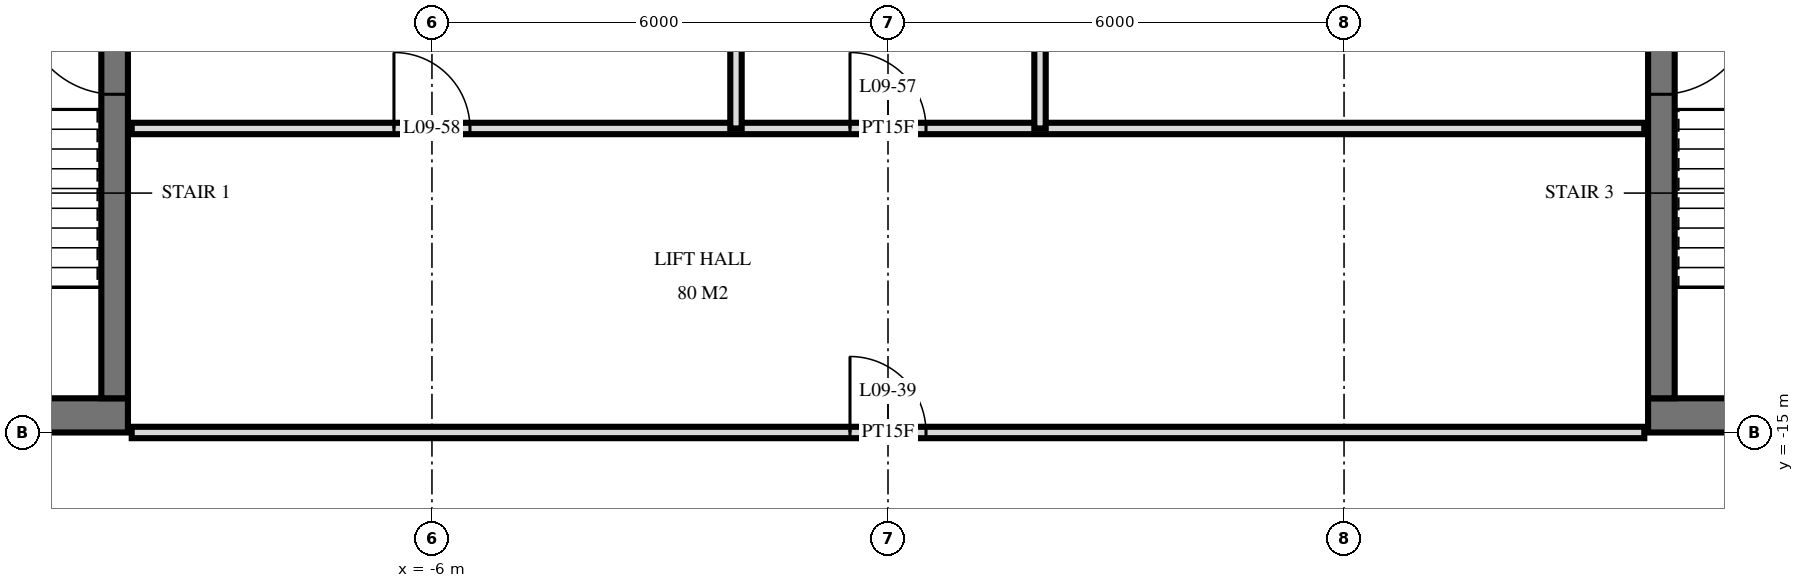
"""IFC4 building model, lengths in metres.
Left out: names, types, materials, properties, quantities, classifications, styles, units other than length and angle.
Written with IfcOpenShell. Run it as: python <this file> out.ifc"""

import sys

from ifc_helpers import new_model, si_unit, direction, frame, frame_2d, origin, place, context, subcontext, project, spatial, rectangle, extrude, element, fill, save


model = new_model("IFC4")
c1 = context("Model", 3, precision=1e-05, world=origin(), true_north=direction((0.0, 1.0)))
c2 = subcontext(c1, "Body", "Model", "MODEL_VIEW")
j1 = project(units=[si_unit("LENGTHUNIT", "METRE"), si_unit("PLANEANGLEUNIT", "RADIAN")], contexts=[c1])
p1 = place(None, origin())
s1 = spatial("IfcSite", under=j1, at=p1, CompositionType="ELEMENT")
p2 = place(p1, origin())
s2 = spatial("IfcBuilding", under=s1, at=p2, CompositionType="ELEMENT")
p3 = place(p2, frame((0.0, 0.0, 42.0)))
s3 = spatial("IfcBuildingStorey", under=s2, at=p3, CompositionType="ELEMENT", Elevation=42.0)
p4 = place(p3, frame((-29.5, -14.775, 0.0), z_axis=(0.0, 0.0, 1.0), x_axis=(1.0, 0.0, 0.0)))
e1 = element("IfcWall", 1, at=p4, inside=s3, PredefinedType="SHEAR", context=c2, shape_type="SweptSolid", body=[
    extrude(rectangle(XDim=19.5, YDim=0.45, at=frame_2d((9.75, 0.0))), origin(), (0.0, 0.0, 1.0), 3.6),
])
p5 = place(p4, frame((11.2, 0.0, 0.0)))
e2 = element("IfcOpeningElement", 2, at=p5, cuts=e1, PredefinedType="OPENING", context=c2, shape_type="SweptSolid", body=[
    extrude(rectangle(XDim=1.2, YDim=2.1, at=frame_2d((0.6, 1.05))), frame((0.0, 0.235, 0.0), z_axis=(0.0, -1.0, 0.0), x_axis=(1.0, 0.0, 0.0)), (0.0, 0.0, 1.0), 0.47),
])
p6 = place(p4, frame((14.25, 0.0, 0.0)))
e3 = element("IfcOpeningElement", 3, at=p6, cuts=e1, PredefinedType="OPENING", context=c2, shape_type="SweptSolid", body=[
    extrude(rectangle(XDim=1.1, YDim=2.1, at=frame_2d((0.55, 1.05))), frame((0.0, 0.235, 0.0), z_axis=(0.0, -1.0, 0.0), x_axis=(1.0, 0.0, 0.0)), (0.0, 0.0, 1.0), 0.47),
])
p7 = place(p4, frame((8.5, 0.0, 0.0)))
e4 = element("IfcOpeningElement", 4, at=p7, cuts=e1, PredefinedType="OPENING", context=c2, shape_type="SweptSolid", body=[
    extrude(rectangle(XDim=0.9, YDim=2.1, at=frame_2d((0.45, 1.05))), frame((0.0, 0.235, 0.0), z_axis=(0.0, -1.0, 0.0), x_axis=(1.0, 0.0, 0.0)), (0.0, 0.0, 1.0), 0.47),
])
p8 = place(p4, frame((6.05, 0.0, 0.0)))
e5 = element("IfcOpeningElement", 5, at=p8, cuts=e1, PredefinedType="OPENING", context=c2, shape_type="SweptSolid", body=[
    extrude(rectangle(XDim=1.0, YDim=2.1, at=frame_2d((0.5, 1.05))), frame((0.0, 0.235, 0.0), z_axis=(0.0, -1.0, 0.0), x_axis=(1.0, 0.0, 0.0)), (0.0, 0.0, 1.0), 0.47),
])
p9 = place(p4, frame((3.587, 0.0, 0.0)))
e6 = element("IfcOpeningElement", 6, at=p9, cuts=e1, PredefinedType="OPENING", context=c2, shape_type="SweptSolid", body=[
    extrude(rectangle(XDim=1.0, YDim=2.1, at=frame_2d((0.5, 1.05))), frame((0.0, 0.235, 0.0), z_axis=(0.0, -1.0, 0.0), x_axis=(1.0, 0.0, 0.0)), (0.0, 0.0, 1.0), 0.47),
])
p10 = place(p4, frame((1.85, 0.0, 0.0)))
e7 = element("IfcOpeningElement", 7, at=p10, cuts=e1, PredefinedType="OPENING", context=c2, shape_type="SweptSolid", body=[
    extrude(rectangle(XDim=1.0, YDim=2.1, at=frame_2d((0.5, 1.05))), frame((0.0, 0.235, 0.0), z_axis=(0.0, -1.0, 0.0), x_axis=(1.0, 0.0, 0.0)), (0.0, 0.0, 1.0), 0.47),
])
p11 = place(p4, frame((0.55, 0.0, 0.0)))
e8 = element("IfcOpeningElement", 8, at=p11, cuts=e1, PredefinedType="OPENING", context=c2, shape_type="SweptSolid", body=[
    extrude(rectangle(XDim=1.0, YDim=2.1, at=frame_2d((0.5, 1.05))), frame((0.0, 0.235, 0.0), z_axis=(0.0, -1.0, 0.0), x_axis=(1.0, 0.0, 0.0)), (0.0, 0.0, 1.0), 0.47),
])
p12 = place(p3, frame((-10.175, -14.55, 0.0), z_axis=(0.0, 0.0, 1.0), x_axis=(0.0, 1.0, 0.0)))
e9 = element("IfcWall", 9, at=p12, inside=s3, PredefinedType="SHEAR", context=c2, shape_type="SweptSolid", body=[
    extrude(rectangle(XDim=14.1, YDim=0.35, at=frame_2d((7.05, 0.0))), origin(), (0.0, 0.0, 1.0), 3.6),
])
p13 = place(p12, frame((8.4, 0.0, 0.0)))
e10 = element("IfcOpeningElement", 10, at=p13, cuts=e9, PredefinedType="OPENING", context=c2, shape_type="SweptSolid", body=[
    extrude(rectangle(XDim=1.4, YDim=2.4, at=frame_2d((0.7, 1.2))), frame((0.0, 0.185, 0.0), z_axis=(0.0, -1.0, 0.0), x_axis=(1.0, 0.0, 0.0)), (0.0, 0.0, 1.0), 0.37),
])
p14 = place(p12, frame((10.0, 0.0, 0.0)))
e11 = element("IfcOpeningElement", 11, at=p14, cuts=e9, PredefinedType="OPENING", context=c2, shape_type="SweptSolid", body=[
    extrude(rectangle(XDim=1.4, YDim=2.4, at=frame_2d((0.7, 1.2))), frame((0.0, 0.185, 0.0), z_axis=(0.0, -1.0, 0.0), x_axis=(1.0, 0.0, 0.0)), (0.0, 0.0, 1.0), 0.37),
])
p15 = place(p12, frame((4.0, 0.0, 0.0)))
e12 = element("IfcOpeningElement", 12, at=p15, cuts=e9, PredefinedType="OPENING", context=c2, shape_type="SweptSolid", body=[
    extrude(rectangle(XDim=1.2, YDim=2.1, at=frame_2d((0.6, 1.05))), frame((0.0, 0.185, 0.0), z_axis=(0.0, -1.0, 0.0), x_axis=(1.0, 0.0, 0.0)), (0.0, 0.0, 1.0), 0.37),
])
p16 = place(p3, frame((10.0, -14.775, 0.0), z_axis=(0.0, 0.0, 1.0), x_axis=(1.0, 0.0, 0.0)))
e13 = element("IfcWall", 13, at=p16, inside=s3, PredefinedType="SHEAR", context=c2, shape_type="SweptSolid", body=[
    extrude(rectangle(XDim=19.5, YDim=0.45, at=frame_2d((9.75, 0.0))), origin(), (0.0, 0.0, 1.0), 3.6),
])
p17 = place(p16, frame((7.1, 0.0, 0.0)))
e14 = element("IfcOpeningElement", 14, at=p17, cuts=e13, PredefinedType="OPENING", context=c2, shape_type="SweptSolid", body=[
    extrude(rectangle(XDim=1.2, YDim=2.1, at=frame_2d((0.6, 1.05))), frame((0.0, 0.235, 0.0), z_axis=(0.0, -1.0, 0.0), x_axis=(1.0, 0.0, 0.0)), (0.0, 0.0, 1.0), 0.47),
])
p18 = place(p16, frame((4.15, 0.0, 0.0)))
e15 = element("IfcOpeningElement", 15, at=p18, cuts=e13, PredefinedType="OPENING", context=c2, shape_type="SweptSolid", body=[
    extrude(rectangle(XDim=1.1, YDim=2.1, at=frame_2d((0.55, 1.05))), frame((0.0, 0.235, 0.0), z_axis=(0.0, -1.0, 0.0), x_axis=(1.0, 0.0, 0.0)), (0.0, 0.0, 1.0), 0.47),
])
p19 = place(p16, frame((10.1, 0.0, 0.0)))
e16 = element("IfcOpeningElement", 16, at=p19, cuts=e13, PredefinedType="OPENING", context=c2, shape_type="SweptSolid", body=[
    extrude(rectangle(XDim=0.9, YDim=2.1, at=frame_2d((0.45, 1.05))), frame((0.0, 0.235, 0.0), z_axis=(0.0, -1.0, 0.0), x_axis=(1.0, 0.0, 0.0)), (0.0, 0.0, 1.0), 0.47),
])
p20 = place(p16, frame((12.45, 0.0, 0.0)))
e17 = element("IfcOpeningElement", 17, at=p20, cuts=e13, PredefinedType="OPENING", context=c2, shape_type="SweptSolid", body=[
    extrude(rectangle(XDim=1.0, YDim=2.1, at=frame_2d((0.5, 1.05))), frame((0.0, 0.235, 0.0), z_axis=(0.0, -1.0, 0.0), x_axis=(1.0, 0.0, 0.0)), (0.0, 0.0, 1.0), 0.47),
])
p21 = place(p16, frame((14.913, 0.0, 0.0)))
e18 = element("IfcOpeningElement", 18, at=p21, cuts=e13, PredefinedType="OPENING", context=c2, shape_type="SweptSolid", body=[
    extrude(rectangle(XDim=1.0, YDim=2.1, at=frame_2d((0.5, 1.05))), frame((0.0, 0.235, 0.0), z_axis=(0.0, -1.0, 0.0), x_axis=(1.0, 0.0, 0.0)), (0.0, 0.0, 1.0), 0.47),
])
p22 = place(p16, frame((16.65, 0.0, 0.0)))
e19 = element("IfcOpeningElement", 19, at=p22, cuts=e13, PredefinedType="OPENING", context=c2, shape_type="SweptSolid", body=[
    extrude(rectangle(XDim=1.0, YDim=2.1, at=frame_2d((0.5, 1.05))), frame((0.0, 0.235, 0.0), z_axis=(0.0, -1.0, 0.0), x_axis=(1.0, 0.0, 0.0)), (0.0, 0.0, 1.0), 0.47),
])
p23 = place(p16, frame((18.025, 0.0, 0.0)))
e20 = element("IfcOpeningElement", 20, at=p23, cuts=e13, PredefinedType="OPENING", context=c2, shape_type="SweptSolid", body=[
    extrude(rectangle(XDim=1.0, YDim=2.1, at=frame_2d((0.5, 1.05))), frame((0.0, 0.235, 0.0), z_axis=(0.0, -1.0, 0.0), x_axis=(1.0, 0.0, 0.0)), (0.0, 0.0, 1.0), 0.47),
])
p24 = place(p3, frame((10.175, -14.55, 0.0), z_axis=(0.0, 0.0, 1.0), x_axis=(0.0, 1.0, 0.0)))
e21 = element("IfcWall", 21, at=p24, inside=s3, PredefinedType="SHEAR", context=c2, shape_type="SweptSolid", body=[
    extrude(rectangle(XDim=14.1, YDim=0.35, at=frame_2d((7.05, 0.0))), origin(), (0.0, 0.0, 1.0), 3.6),
])
p25 = place(p24, frame((8.4, 0.0, 0.0)))
e22 = element("IfcOpeningElement", 22, at=p25, cuts=e21, PredefinedType="OPENING", context=c2, shape_type="SweptSolid", body=[
    extrude(rectangle(XDim=1.4, YDim=2.4, at=frame_2d((0.7, 1.2))), frame((0.0, 0.185, 0.0), z_axis=(0.0, -1.0, 0.0), x_axis=(1.0, 0.0, 0.0)), (0.0, 0.0, 1.0), 0.37),
])
p26 = place(p24, frame((10.0, 0.0, 0.0)))
e23 = element("IfcOpeningElement", 23, at=p26, cuts=e21, PredefinedType="OPENING", context=c2, shape_type="SweptSolid", body=[
    extrude(rectangle(XDim=1.4, YDim=2.4, at=frame_2d((0.7, 1.2))), frame((0.0, 0.185, 0.0), z_axis=(0.0, -1.0, 0.0), x_axis=(1.0, 0.0, 0.0)), (0.0, 0.0, 1.0), 0.37),
])
p27 = place(p24, frame((4.0, 0.0, 0.0)))
e24 = element("IfcOpeningElement", 24, at=p27, cuts=e21, PredefinedType="OPENING", context=c2, shape_type="SweptSolid", body=[
    extrude(rectangle(XDim=1.2, YDim=2.1, at=frame_2d((0.6, 1.05))), frame((0.0, 0.185, 0.0), z_axis=(0.0, -1.0, 0.0), x_axis=(1.0, 0.0, 0.0)), (0.0, 0.0, 1.0), 0.37),
])
for number, where, z_axis, x_axis in (
    (25, (2.0, -11.0, 0.0), (0.0, 0.0, 1.0), (0.0, 1.0, 0.0)),
    (26, (-2.0, -11.0, 0.0), (0.0, 0.0, 1.0), (0.0, 1.0, 0.0)),
):
    element("IfcWall", number, at=place(p3, frame(where, z_axis=z_axis, x_axis=x_axis)), inside=s3, PredefinedType="PARTITIONING", context=c2, shape_type="SweptSolid", body=[
        extrude(rectangle(XDim=4.0, YDim=0.15, at=frame_2d((2.0, 0.0))), origin(), (0.0, 0.0, 1.0), 3.32),
    ])
p28 = place(p3, frame((-9.95, -15.0, 0.0), z_axis=(0.0, 0.0, 1.0), x_axis=(1.0, 0.0, 0.0)))
e27 = element("IfcWall", 27, at=p28, inside=s3, PredefinedType="PARTITIONING", context=c2, shape_type="SweptSolid", body=[
    extrude(rectangle(XDim=19.9, YDim=0.15, at=frame_2d((9.95, 0.0))), origin(), (0.0, 0.0, 1.0), 2.684),
])
p29 = place(p28, frame((9.45, 0.0, 0.0)))
e28 = element("IfcOpeningElement", 28, at=p29, cuts=e27, PredefinedType="OPENING", context=c2, shape_type="SweptSolid", body=[
    extrude(rectangle(XDim=1.0, YDim=2.1, at=frame_2d((0.5, 1.05))), frame((0.0, 0.085, 0.0), z_axis=(0.0, -1.0, 0.0), x_axis=(1.0, 0.0, 0.0)), (0.0, 0.0, 1.0), 0.17),
])
p30 = place(p3, frame((-9.95, -11.0, 0.0), z_axis=(0.0, 0.0, 1.0), x_axis=(1.0, 0.0, 0.0)))
e29 = element("IfcWall", 29, at=p30, inside=s3, PredefinedType="PARTITIONING", context=c2, shape_type="SweptSolid", body=[
    extrude(rectangle(XDim=19.9, YDim=0.15, at=frame_2d((9.95, 0.0))), origin(), (0.0, 0.0, 1.0), 3.32),
])
p31 = place(p30, frame((9.45, 0.0, 0.0)))
e30 = element("IfcOpeningElement", 30, at=p31, cuts=e29, PredefinedType="OPENING", context=c2, shape_type="SweptSolid", body=[
    extrude(rectangle(XDim=1.0, YDim=2.1, at=frame_2d((0.5, 1.05))), frame((0.0, 0.085, 0.0), z_axis=(0.0, -1.0, 0.0), x_axis=(1.0, 0.0, 0.0)), (0.0, 0.0, 1.0), 0.17),
])
p32 = place(p30, frame((3.45, 0.0, 0.0)))
e31 = element("IfcOpeningElement", 31, at=p32, cuts=e29, PredefinedType="OPENING", context=c2, shape_type="SweptSolid", body=[
    extrude(rectangle(XDim=1.0, YDim=2.1, at=frame_2d((0.5, 1.05))), frame((0.0, 0.085, 0.0), z_axis=(0.0, -1.0, 0.0), x_axis=(1.0, 0.0, 0.0)), (0.0, 0.0, 1.0), 0.17),
])
p33 = place(p15, origin())
e32 = element("IfcDoor", 32, at=p33, inside=s3, OperationType="SINGLE_SWING_LEFT", PredefinedType="DOOR", context=c2, shape_type="SweptSolid", body=[
    extrude(rectangle(XDim=1.2, YDim=2.1, at=frame_2d((0.6, 1.05))), frame((0.0, 0.025, 0.0), z_axis=(0.0, -1.0, 0.0), x_axis=(1.0, 0.0, 0.0)), (0.0, 0.0, 1.0), 0.05),
])
fill(e12, e32)
p34 = place(p27, frame((0.6, 0.0, 0.0), z_axis=(0.0, 0.0, 1.0), x_axis=(-1.0, 0.0, 0.0)))
e33 = element("IfcDoor", 33, at=p34, inside=s3, OperationType="SINGLE_SWING_RIGHT", PredefinedType="DOOR", context=c2, shape_type="SweptSolid", body=[
    extrude(rectangle(XDim=1.2, YDim=2.1, at=frame_2d((0.0, 1.05))), frame((0.0, -0.025, 0.0), z_axis=(0.0, 1.0, 0.0), x_axis=(-1.0, 0.0, 0.0)), (0.0, 0.0, 1.0), 0.05),
])
fill(e24, e33)
p35 = place(p29, origin())
e34 = element("IfcDoor", 34, at=p35, inside=s3, OperationType="SINGLE_SWING_RIGHT", PredefinedType="DOOR", context=c2, shape_type="SweptSolid", body=[
    extrude(rectangle(XDim=1.0, YDim=2.1, at=frame_2d((0.5, 1.05))), frame((0.0, 0.025, 0.0), z_axis=(0.0, -1.0, 0.0), x_axis=(1.0, 0.0, 0.0)), (0.0, 0.0, 1.0), 0.05),
])
fill(e28, e34)
p36 = place(p31, origin())
e35 = element("IfcDoor", 35, at=p36, inside=s3, OperationType="SINGLE_SWING_RIGHT", PredefinedType="DOOR", context=c2, shape_type="SweptSolid", body=[
    extrude(rectangle(XDim=1.0, YDim=2.1, at=frame_2d((0.5, 1.05))), frame((0.0, 0.025, 0.0), z_axis=(0.0, -1.0, 0.0), x_axis=(1.0, 0.0, 0.0)), (0.0, 0.0, 1.0), 0.05),
])
fill(e30, e35)
p37 = place(p32, origin())
e36 = element("IfcDoor", 36, at=p37, inside=s3, OperationType="SINGLE_SWING_RIGHT", PredefinedType="DOOR", context=c2, shape_type="SweptSolid", body=[
    extrude(rectangle(XDim=1.0, YDim=2.1, at=frame_2d((0.5, 1.05))), frame((0.0, 0.025, 0.0), z_axis=(0.0, -1.0, 0.0), x_axis=(1.0, 0.0, 0.0)), (0.0, 0.0, 1.0), 0.05),
])
fill(e31, e36)
save(model, sys.argv[1])
